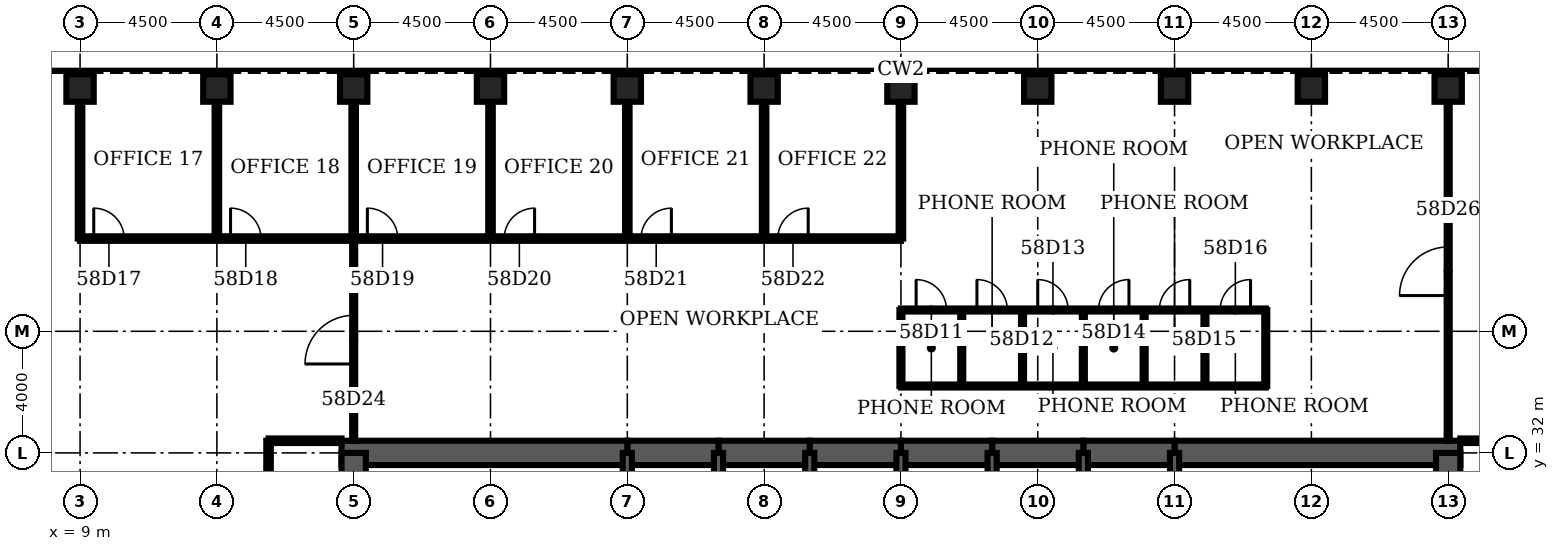
"""IFC4 building model, lengths in metres.
Left out: names, types, materials, properties, quantities, classifications, styles, units other than length and angle.
Written with IfcOpenShell. Run it as: python <this file> out.ifc"""

import sys

from ifc_helpers import new_model, si_unit, direction, frame, frame_2d, origin, origin_2d, place, context, subcontext, project, spatial, rectangle, hollow_rectangle, extrude, element, fill, save


model = new_model("IFC4")
c1 = context("Model", 3, precision=1e-05, world=origin(), true_north=direction((0.0, 1.0)))
c2 = subcontext(c1, "Body", "Model", "MODEL_VIEW")
j1 = project(units=[si_unit("LENGTHUNIT", "METRE"), si_unit("PLANEANGLEUNIT", "RADIAN")], contexts=[c1])
p1 = place(None, origin())
s1 = spatial("IfcSite", under=j1, at=p1, CompositionType="ELEMENT")
p2 = place(p1, origin())
s2 = spatial("IfcBuilding", under=s1, at=p2, CompositionType="ELEMENT")
p3 = place(p2, frame((0.0, 0.0, 257.2)))
s3 = spatial("IfcBuildingStorey", under=s2, at=p3, CompositionType="ELEMENT", Elevation=257.2)
for number, where, z_axis, x_axis in (
    (1, (54.0, 44.0, 0.0), (0.0, 0.0, 1.0), (0.0, 1.0, 0.0)),
    (2, (49.5, 44.0, 0.0), (0.0, 0.0, 1.0), (0.0, 1.0, 0.0)),
    (3, (45.0, 44.0, 0.0), (0.0, 0.0, 1.0), (0.0, 1.0, 0.0)),
    (4, (40.5, 44.0, 0.0), (0.0, 0.0, 1.0), (0.0, 1.0, 0.0)),
    (5, (36.0, 44.0, 0.0), (0.0, 0.0, 1.0), (0.0, 1.0, 0.0)),
    (6, (31.5, 44.0, 0.0), (0.0, 0.0, 1.0), (0.0, 1.0, 0.0)),
    (7, (27.0, 44.0, 0.0), (0.0, 0.0, 1.0), (0.0, 1.0, 0.0)),
    (8, (22.5, 44.0, 0.0), (0.0, 0.0, 1.0), (0.0, 1.0, 0.0)),
    (9, (18.0, 44.0, 0.0), (0.0, 0.0, 1.0), (0.0, 1.0, 0.0)),
    (10, (13.5, 44.0, 0.0), (0.0, 0.0, 1.0), (0.0, 1.0, 0.0)),
    (11, (9.0, 44.0, 0.0), (0.0, 0.0, 1.0), (0.0, 1.0, 0.0)),
):
    element("IfcColumn", number, at=place(p3, frame(where, z_axis=z_axis, x_axis=x_axis)), inside=s3, PredefinedType="COLUMN", context=c2, shape_type="SweptSolid", body=[
        extrude(hollow_rectangle(XDim=0.9, YDim=0.9, WallThickness=0.07, at=origin_2d()), origin(), (0.0, 0.0, 1.0), 4.2),
    ])
p4 = place(p3, frame((54.4, 32.0, 0.0), z_axis=(0.0, 0.0, 1.0), x_axis=(-1.0, 0.0, 0.0)))
e12 = element("IfcWall", 12, at=p4, inside=s3, PredefinedType="SHEAR", context=c2, shape_type="SweptSolid", body=[
    extrude(rectangle(XDim=9.4, YDim=0.8, at=frame_2d((4.7, 0.0))), origin(), (0.0, 0.0, 1.0), 4.2),
])
for number, where, z_axis, x_axis in (
    (13, (45.0, 32.0, 0.0), (0.0, 0.0, 1.0), (-1.0, 0.0, 0.0)),
    (14, (42.0, 32.0, 0.0), (0.0, 0.0, 1.0), (-1.0, 0.0, 0.0)),
    (15, (39.0, 32.0, 0.0), (0.0, 0.0, 1.0), (-1.0, 0.0, 0.0)),
    (16, (36.0, 32.0, 0.0), (0.0, 0.0, 1.0), (-1.0, 0.0, 0.0)),
    (17, (33.0, 32.0, 0.0), (0.0, 0.0, 1.0), (-1.0, 0.0, 0.0)),
    (18, (30.0, 32.0, 0.0), (0.0, 0.0, 1.0), (-1.0, 0.0, 0.0)),
):
    element("IfcWall", number, at=place(p3, frame(where, z_axis=z_axis, x_axis=x_axis)), inside=s3, PredefinedType="SHEAR", context=c2, shape_type="SweptSolid", body=[
        extrude(rectangle(XDim=3.0, YDim=0.8, at=frame_2d((1.5, 0.0))), origin(), (0.0, 0.0, 1.0), 4.2),
    ])
p5 = place(p3, frame((27.0, 32.0, 0.0), z_axis=(0.0, 0.0, 1.0), x_axis=(-1.0, 0.0, 0.0)))
e19 = element("IfcWall", 19, at=p5, inside=s3, PredefinedType="SHEAR", context=c2, shape_type="SweptSolid", body=[
    extrude(rectangle(XDim=9.4, YDim=0.8, at=frame_2d((4.7, 0.0))), origin(), (0.0, 0.0, 1.0), 4.2),
])
for number, where, z_axis, x_axis in (
    (20, (18.0, 32.0, 0.0), (0.0, 0.0, 1.0), (0.0, -1.0, 0.0)),
    (21, (54.0, 28.8, 0.0), (0.0, 0.0, 1.0), (0.0, 1.0, 0.0)),
):
    element("IfcWall", number, at=place(p3, frame(where, z_axis=z_axis, x_axis=x_axis)), inside=s3, PredefinedType="SHEAR", context=c2, shape_type="SweptSolid", body=[
        extrude(rectangle(XDim=3.2, YDim=0.8, at=frame_2d((1.6, 0.0))), origin(), (0.0, 0.0, 1.0), 4.2),
    ])
for number, where, z_axis, x_axis in (
    (22, (27.0, 28.8, 0.0), (0.0, 0.0, 1.0), (0.0, 1.0, 0.0)),
    (23, (30.0, 28.8, 0.0), (0.0, 0.0, 1.0), (0.0, 1.0, 0.0)),
    (24, (33.0, 28.8, 0.0), (0.0, 0.0, 1.0), (0.0, 1.0, 0.0)),
    (25, (36.0, 28.8, 0.0), (0.0, 0.0, 1.0), (0.0, 1.0, 0.0)),
    (26, (39.0, 28.8, 0.0), (0.0, 0.0, 1.0), (0.0, 1.0, 0.0)),
    (27, (42.0, 28.8, 0.0), (0.0, 0.0, 1.0), (0.0, 1.0, 0.0)),
    (28, (45.0, 28.8, 0.0), (0.0, 0.0, 1.0), (0.0, 1.0, 0.0)),
):
    element("IfcWall", number, at=place(p3, frame(where, z_axis=z_axis, x_axis=x_axis)), inside=s3, PredefinedType="SOLIDWALL", context=c2, shape_type="SweptSolid", body=[
        extrude(rectangle(XDim=3.2, YDim=0.3, at=frame_2d((1.6, 0.0))), origin(), (0.0, 0.0, 1.0), 4.2),
    ])
for number, where, z_axis, x_axis in (
    (29, (15.2, 32.4, 0.0), (0.0, 0.0, 1.0), (1.0, 0.0, 0.0)),
    (30, (54.4, 32.4, 0.0), (0.0, 0.0, 1.0), (1.0, 0.0, 0.0)),
):
    element("IfcWall", number, at=place(p3, frame(where, z_axis=z_axis, x_axis=x_axis)), inside=s3, PredefinedType="PARTITIONING", context=c2, shape_type="SweptSolid", body=[
        extrude(rectangle(XDim=2.4, YDim=0.15, at=frame_2d((1.2, 0.0))), origin(), (0.0, 0.0, 1.0), 3.0),
    ])
p6 = place(p3, frame((36.0, 34.2, 0.0), z_axis=(0.0, 0.0, 1.0), x_axis=(1.0, 0.0, 0.0)))
e31 = element("IfcWall", 31, at=p6, inside=s3, PredefinedType="PARTITIONING", context=c2, shape_type="SweptSolid", body=[
    extrude(rectangle(XDim=12.0, YDim=0.1, at=frame_2d((6.0, 0.0))), origin(), (0.0, 0.0, 1.0), 3.0),
])
p7 = place(p3, frame((36.0, 36.7, 0.0), z_axis=(0.0, 0.0, 1.0), x_axis=(1.0, 0.0, 0.0)))
e32 = element("IfcWall", 32, at=p7, inside=s3, PredefinedType="PARTITIONING", context=c2, shape_type="SweptSolid", body=[
    extrude(rectangle(XDim=12.0, YDim=0.1, at=frame_2d((6.0, 0.0))), origin(), (0.0, 0.0, 1.0), 3.0),
])
p8 = place(p7, frame((0.5, 0.0, 0.0)))
e33 = element("IfcOpeningElement", 33, at=p8, cuts=e32, PredefinedType="OPENING", context=c2, shape_type="SweptSolid", body=[
    extrude(rectangle(XDim=1.0, YDim=2.1, at=frame_2d((0.5, 1.05))), frame((0.0, 0.06, 0.0), z_axis=(0.0, -1.0, 0.0), x_axis=(1.0, 0.0, 0.0)), (0.0, 0.0, 1.0), 0.12),
])
p9 = place(p7, frame((2.5, 0.0, 0.0)))
e34 = element("IfcOpeningElement", 34, at=p9, cuts=e32, PredefinedType="OPENING", context=c2, shape_type="SweptSolid", body=[
    extrude(rectangle(XDim=1.0, YDim=2.1, at=frame_2d((0.5, 1.05))), frame((0.0, 0.06, 0.0), z_axis=(0.0, -1.0, 0.0), x_axis=(1.0, 0.0, 0.0)), (0.0, 0.0, 1.0), 0.12),
])
p10 = place(p7, frame((4.5, 0.0, 0.0)))
e35 = element("IfcOpeningElement", 35, at=p10, cuts=e32, PredefinedType="OPENING", context=c2, shape_type="SweptSolid", body=[
    extrude(rectangle(XDim=1.0, YDim=2.1, at=frame_2d((0.5, 1.05))), frame((0.0, 0.06, 0.0), z_axis=(0.0, -1.0, 0.0), x_axis=(1.0, 0.0, 0.0)), (0.0, 0.0, 1.0), 0.12),
])
p11 = place(p7, frame((6.5, 0.0, 0.0)))
e36 = element("IfcOpeningElement", 36, at=p11, cuts=e32, PredefinedType="OPENING", context=c2, shape_type="SweptSolid", body=[
    extrude(rectangle(XDim=1.0, YDim=2.1, at=frame_2d((0.5, 1.05))), frame((0.0, 0.06, 0.0), z_axis=(0.0, -1.0, 0.0), x_axis=(1.0, 0.0, 0.0)), (0.0, 0.0, 1.0), 0.12),
])
p12 = place(p7, frame((8.5, 0.0, 0.0)))
e37 = element("IfcOpeningElement", 37, at=p12, cuts=e32, PredefinedType="OPENING", context=c2, shape_type="SweptSolid", body=[
    extrude(rectangle(XDim=1.0, YDim=2.1, at=frame_2d((0.5, 1.05))), frame((0.0, 0.06, 0.0), z_axis=(0.0, -1.0, 0.0), x_axis=(1.0, 0.0, 0.0)), (0.0, 0.0, 1.0), 0.12),
])
p13 = place(p7, frame((10.5, 0.0, 0.0)))
e38 = element("IfcOpeningElement", 38, at=p13, cuts=e32, PredefinedType="OPENING", context=c2, shape_type="SweptSolid", body=[
    extrude(rectangle(XDim=1.0, YDim=2.1, at=frame_2d((0.5, 1.05))), frame((0.0, 0.06, 0.0), z_axis=(0.0, -1.0, 0.0), x_axis=(1.0, 0.0, 0.0)), (0.0, 0.0, 1.0), 0.12),
])
p14 = place(p3, frame((9.0, 39.05, 0.0), z_axis=(0.0, 0.0, 1.0), x_axis=(1.0, 0.0, 0.0)))
e39 = element("IfcWall", 39, at=p14, inside=s3, PredefinedType="PARTITIONING", context=c2, shape_type="SweptSolid", body=[
    extrude(rectangle(XDim=27.0, YDim=0.15, at=frame_2d((13.5, 0.0))), origin(), (0.0, 0.0, 1.0), 3.0),
])
p15 = place(p14, frame((0.45, 0.0, 0.0)))
e40 = element("IfcOpeningElement", 40, at=p15, cuts=e39, PredefinedType="OPENING", context=c2, shape_type="SweptSolid", body=[
    extrude(rectangle(XDim=1.0, YDim=2.1, at=frame_2d((0.5, 1.05))), frame((0.0, 0.085, 0.0), z_axis=(0.0, -1.0, 0.0), x_axis=(1.0, 0.0, 0.0)), (0.0, 0.0, 1.0), 0.17),
])
p16 = place(p14, frame((4.95, 0.0, 0.0)))
e41 = element("IfcOpeningElement", 41, at=p16, cuts=e39, PredefinedType="OPENING", context=c2, shape_type="SweptSolid", body=[
    extrude(rectangle(XDim=1.0, YDim=2.1, at=frame_2d((0.5, 1.05))), frame((0.0, 0.085, 0.0), z_axis=(0.0, -1.0, 0.0), x_axis=(1.0, 0.0, 0.0)), (0.0, 0.0, 1.0), 0.17),
])
p17 = place(p14, frame((9.45, 0.0, 0.0)))
e42 = element("IfcOpeningElement", 42, at=p17, cuts=e39, PredefinedType="OPENING", context=c2, shape_type="SweptSolid", body=[
    extrude(rectangle(XDim=1.0, YDim=2.1, at=frame_2d((0.5, 1.05))), frame((0.0, 0.085, 0.0), z_axis=(0.0, -1.0, 0.0), x_axis=(1.0, 0.0, 0.0)), (0.0, 0.0, 1.0), 0.17),
])
p18 = place(p14, frame((13.95, 0.0, 0.0)))
e43 = element("IfcOpeningElement", 43, at=p18, cuts=e39, PredefinedType="OPENING", context=c2, shape_type="SweptSolid", body=[
    extrude(rectangle(XDim=1.0, YDim=2.1, at=frame_2d((0.5, 1.05))), frame((0.0, 0.085, 0.0), z_axis=(0.0, -1.0, 0.0), x_axis=(1.0, 0.0, 0.0)), (0.0, 0.0, 1.0), 0.17),
])
p19 = place(p14, frame((18.45, 0.0, 0.0)))
e44 = element("IfcOpeningElement", 44, at=p19, cuts=e39, PredefinedType="OPENING", context=c2, shape_type="SweptSolid", body=[
    extrude(rectangle(XDim=1.0, YDim=2.1, at=frame_2d((0.5, 1.05))), frame((0.0, 0.085, 0.0), z_axis=(0.0, -1.0, 0.0), x_axis=(1.0, 0.0, 0.0)), (0.0, 0.0, 1.0), 0.17),
])
p20 = place(p14, frame((22.95, 0.0, 0.0)))
e45 = element("IfcOpeningElement", 45, at=p20, cuts=e39, PredefinedType="OPENING", context=c2, shape_type="SweptSolid", body=[
    extrude(rectangle(XDim=1.0, YDim=2.1, at=frame_2d((0.5, 1.05))), frame((0.0, 0.085, 0.0), z_axis=(0.0, -1.0, 0.0), x_axis=(1.0, 0.0, 0.0)), (0.0, 0.0, 1.0), 0.17),
])
for number, where, z_axis, x_axis in (
    (46, (9.0, 39.05, 0.0), (0.0, 0.0, 1.0), (0.0, 1.0, 0.0)),
    (47, (13.5, 39.05, 0.0), (0.0, 0.0, 1.0), (0.0, 1.0, 0.0)),
):
    element("IfcWall", number, at=place(p3, frame(where, z_axis=z_axis, x_axis=x_axis)), inside=s3, PredefinedType="PARTITIONING", context=c2, shape_type="SweptSolid", body=[
        extrude(rectangle(XDim=4.5, YDim=0.15, at=frame_2d((2.25, 0.0))), origin(), (0.0, 0.0, 1.0), 3.0),
    ])
p21 = place(p3, frame((15.2, 13.8, 0.0), z_axis=(0.0, 0.0, 1.0), x_axis=(0.0, 1.0, 0.0)))
e48 = element("IfcWall", 48, at=p21, inside=s3, PredefinedType="PARTITIONING", context=c2, shape_type="SweptSolid", body=[
    extrude(rectangle(XDim=18.6, YDim=0.15, at=frame_2d((9.3, 0.0))), origin(), (0.0, 0.0, 1.0), 3.0),
])
p22 = place(p21, frame((8.7, 0.0, 0.0)))
e49 = element("IfcOpeningElement", 49, at=p22, cuts=e48, PredefinedType="OPENING", context=c2, shape_type="SweptSolid", body=[
    extrude(rectangle(XDim=1.2, YDim=2.1, at=frame_2d((0.6, 1.05))), frame((0.0, 0.085, 0.0), z_axis=(0.0, -1.0, 0.0), x_axis=(1.0, 0.0, 0.0)), (0.0, 0.0, 1.0), 0.17),
])
p23 = place(p3, frame((18.0, 32.4, 0.0), z_axis=(0.0, 0.0, 1.0), x_axis=(0.0, 1.0, 0.0)))
e50 = element("IfcWall", 50, at=p23, inside=s3, PredefinedType="PARTITIONING", context=c2, shape_type="SweptSolid", body=[
    extrude(rectangle(XDim=6.65, YDim=0.1, at=frame_2d((3.325, 0.0))), origin(), (0.0, 0.0, 1.0), 3.0),
])
p24 = place(p23, frame((2.525, 0.0, 0.0)))
e51 = element("IfcOpeningElement", 51, at=p24, cuts=e50, PredefinedType="OPENING", context=c2, shape_type="SweptSolid", body=[
    extrude(rectangle(XDim=1.6, YDim=2.1, at=frame_2d((0.8, 1.05))), frame((0.0, 0.06, 0.0), z_axis=(0.0, -1.0, 0.0), x_axis=(1.0, 0.0, 0.0)), (0.0, 0.0, 1.0), 0.12),
])
for number, where, z_axis, x_axis in (
    (52, (18.0, 39.05, 0.0), (0.0, 0.0, 1.0), (0.0, 1.0, 0.0)),
    (53, (22.5, 39.05, 0.0), (0.0, 0.0, 1.0), (0.0, 1.0, 0.0)),
    (54, (27.0, 39.05, 0.0), (0.0, 0.0, 1.0), (0.0, 1.0, 0.0)),
    (55, (31.5, 39.05, 0.0), (0.0, 0.0, 1.0), (0.0, 1.0, 0.0)),
):
    element("IfcWall", number, at=place(p3, frame(where, z_axis=z_axis, x_axis=x_axis)), inside=s3, PredefinedType="PARTITIONING", context=c2, shape_type="SweptSolid", body=[
        extrude(rectangle(XDim=4.5, YDim=0.15, at=frame_2d((2.25, 0.0))), origin(), (0.0, 0.0, 1.0), 3.0),
    ])
p25 = place(p3, frame((36.0, 34.2, 0.0), z_axis=(0.0, 0.0, 1.0), x_axis=(0.0, 1.0, 0.0)))
e56 = element("IfcWall", 56, at=p25, inside=s3, PredefinedType="PARTITIONING", context=c2, shape_type="SweptSolid", body=[
    extrude(rectangle(XDim=2.5, YDim=0.1, at=frame_2d((1.25, 0.0))), origin(), (0.0, 0.0, 1.0), 3.0),
])
p26 = place(p3, frame((36.0, 39.05, 0.0), z_axis=(0.0, 0.0, 1.0), x_axis=(0.0, 1.0, 0.0)))
e57 = element("IfcWall", 57, at=p26, inside=s3, PredefinedType="PARTITIONING", context=c2, shape_type="SweptSolid", body=[
    extrude(rectangle(XDim=4.5, YDim=0.15, at=frame_2d((2.25, 0.0))), origin(), (0.0, 0.0, 1.0), 3.0),
])
for number, where, z_axis, x_axis in (
    (58, (38.0, 34.2, 0.0), (0.0, 0.0, 1.0), (0.0, 1.0, 0.0)),
    (59, (40.0, 34.2, 0.0), (0.0, 0.0, 1.0), (0.0, 1.0, 0.0)),
    (60, (42.0, 34.2, 0.0), (0.0, 0.0, 1.0), (0.0, 1.0, 0.0)),
    (61, (44.0, 34.2, 0.0), (0.0, 0.0, 1.0), (0.0, 1.0, 0.0)),
    (62, (46.0, 34.2, 0.0), (0.0, 0.0, 1.0), (0.0, 1.0, 0.0)),
    (63, (48.0, 34.2, 0.0), (0.0, 0.0, 1.0), (0.0, 1.0, 0.0)),
):
    element("IfcWall", number, at=place(p3, frame(where, z_axis=z_axis, x_axis=x_axis)), inside=s3, PredefinedType="PARTITIONING", context=c2, shape_type="SweptSolid", body=[
        extrude(rectangle(XDim=2.5, YDim=0.1, at=frame_2d((1.25, 0.0))), origin(), (0.0, 0.0, 1.0), 3.0),
    ])
p27 = place(p3, frame((54.0, 32.4, 0.0), z_axis=(0.0, 0.0, 1.0), x_axis=(0.0, 1.0, 0.0)))
e64 = element("IfcWall", 64, at=p27, inside=s3, PredefinedType="PARTITIONING", context=c2, shape_type="SweptSolid", body=[
    extrude(rectangle(XDim=11.15, YDim=0.1, at=frame_2d((5.575, 0.0))), origin(), (0.0, 0.0, 1.0), 3.0),
])
p28 = place(p27, frame((4.775, 0.0, 0.0)))
e65 = element("IfcOpeningElement", 65, at=p28, cuts=e64, PredefinedType="OPENING", context=c2, shape_type="SweptSolid", body=[
    extrude(rectangle(XDim=1.6, YDim=2.1, at=frame_2d((0.8, 1.05))), frame((0.0, 0.06, 0.0), z_axis=(0.0, -1.0, 0.0), x_axis=(1.0, 0.0, 0.0)), (0.0, 0.0, 1.0), 0.12),
])
p29 = place(p8, origin())
e66 = element("IfcDoor", 66, at=p29, inside=s3, OperationType="SINGLE_SWING_LEFT", PredefinedType="DOOR", context=c2, shape_type="SweptSolid", body=[
    extrude(rectangle(XDim=1.0, YDim=2.1, at=frame_2d((0.5, 1.05))), frame((0.0, 0.025, 0.0), z_axis=(0.0, -1.0, 0.0), x_axis=(1.0, 0.0, 0.0)), (0.0, 0.0, 1.0), 0.05),
])
fill(e33, e66)
p30 = place(p9, origin())
e67 = element("IfcDoor", 67, at=p30, inside=s3, OperationType="SINGLE_SWING_LEFT", PredefinedType="DOOR", context=c2, shape_type="SweptSolid", body=[
    extrude(rectangle(XDim=1.0, YDim=2.1, at=frame_2d((0.5, 1.05))), frame((0.0, 0.025, 0.0), z_axis=(0.0, -1.0, 0.0), x_axis=(1.0, 0.0, 0.0)), (0.0, 0.0, 1.0), 0.05),
])
fill(e34, e67)
p31 = place(p10, origin())
e68 = element("IfcDoor", 68, at=p31, inside=s3, OperationType="SINGLE_SWING_LEFT", PredefinedType="DOOR", context=c2, shape_type="SweptSolid", body=[
    extrude(rectangle(XDim=1.0, YDim=2.1, at=frame_2d((0.5, 1.05))), frame((0.0, 0.025, 0.0), z_axis=(0.0, -1.0, 0.0), x_axis=(1.0, 0.0, 0.0)), (0.0, 0.0, 1.0), 0.05),
])
fill(e35, e68)
p32 = place(p11, origin())
e69 = element("IfcDoor", 69, at=p32, inside=s3, OperationType="SINGLE_SWING_RIGHT", PredefinedType="DOOR", context=c2, shape_type="SweptSolid", body=[
    extrude(rectangle(XDim=1.0, YDim=2.1, at=frame_2d((0.5, 1.05))), frame((0.0, 0.025, 0.0), z_axis=(0.0, -1.0, 0.0), x_axis=(1.0, 0.0, 0.0)), (0.0, 0.0, 1.0), 0.05),
])
fill(e36, e69)
p33 = place(p12, origin())
e70 = element("IfcDoor", 70, at=p33, inside=s3, OperationType="SINGLE_SWING_RIGHT", PredefinedType="DOOR", context=c2, shape_type="SweptSolid", body=[
    extrude(rectangle(XDim=1.0, YDim=2.1, at=frame_2d((0.5, 1.05))), frame((0.0, 0.025, 0.0), z_axis=(0.0, -1.0, 0.0), x_axis=(1.0, 0.0, 0.0)), (0.0, 0.0, 1.0), 0.05),
])
fill(e37, e70)
p34 = place(p13, origin())
e71 = element("IfcDoor", 71, at=p34, inside=s3, OperationType="SINGLE_SWING_RIGHT", PredefinedType="DOOR", context=c2, shape_type="SweptSolid", body=[
    extrude(rectangle(XDim=1.0, YDim=2.1, at=frame_2d((0.5, 1.05))), frame((0.0, 0.025, 0.0), z_axis=(0.0, -1.0, 0.0), x_axis=(1.0, 0.0, 0.0)), (0.0, 0.0, 1.0), 0.05),
])
fill(e38, e71)
p35 = place(p15, origin())
e72 = element("IfcDoor", 72, at=p35, inside=s3, OperationType="SINGLE_SWING_LEFT", PredefinedType="DOOR", context=c2, shape_type="SweptSolid", body=[
    extrude(rectangle(XDim=1.0, YDim=2.1, at=frame_2d((0.5, 1.05))), frame((0.0, 0.025, 0.0), z_axis=(0.0, -1.0, 0.0), x_axis=(1.0, 0.0, 0.0)), (0.0, 0.0, 1.0), 0.05),
])
fill(e40, e72)
p36 = place(p16, origin())
e73 = element("IfcDoor", 73, at=p36, inside=s3, OperationType="SINGLE_SWING_LEFT", PredefinedType="DOOR", context=c2, shape_type="SweptSolid", body=[
    extrude(rectangle(XDim=1.0, YDim=2.1, at=frame_2d((0.5, 1.05))), frame((0.0, 0.025, 0.0), z_axis=(0.0, -1.0, 0.0), x_axis=(1.0, 0.0, 0.0)), (0.0, 0.0, 1.0), 0.05),
])
fill(e41, e73)
p37 = place(p17, origin())
e74 = element("IfcDoor", 74, at=p37, inside=s3, OperationType="SINGLE_SWING_LEFT", PredefinedType="DOOR", context=c2, shape_type="SweptSolid", body=[
    extrude(rectangle(XDim=1.0, YDim=2.1, at=frame_2d((0.5, 1.05))), frame((0.0, 0.025, 0.0), z_axis=(0.0, -1.0, 0.0), x_axis=(1.0, 0.0, 0.0)), (0.0, 0.0, 1.0), 0.05),
])
fill(e42, e74)
p38 = place(p18, origin())
e75 = element("IfcDoor", 75, at=p38, inside=s3, OperationType="SINGLE_SWING_RIGHT", PredefinedType="DOOR", context=c2, shape_type="SweptSolid", body=[
    extrude(rectangle(XDim=1.0, YDim=2.1, at=frame_2d((0.5, 1.05))), frame((0.0, 0.025, 0.0), z_axis=(0.0, -1.0, 0.0), x_axis=(1.0, 0.0, 0.0)), (0.0, 0.0, 1.0), 0.05),
])
fill(e43, e75)
p39 = place(p19, origin())
e76 = element("IfcDoor", 76, at=p39, inside=s3, OperationType="SINGLE_SWING_RIGHT", PredefinedType="DOOR", context=c2, shape_type="SweptSolid", body=[
    extrude(rectangle(XDim=1.0, YDim=2.1, at=frame_2d((0.5, 1.05))), frame((0.0, 0.025, 0.0), z_axis=(0.0, -1.0, 0.0), x_axis=(1.0, 0.0, 0.0)), (0.0, 0.0, 1.0), 0.05),
])
fill(e44, e76)
p40 = place(p20, origin())
e77 = element("IfcDoor", 77, at=p40, inside=s3, OperationType="SINGLE_SWING_RIGHT", PredefinedType="DOOR", context=c2, shape_type="SweptSolid", body=[
    extrude(rectangle(XDim=1.0, YDim=2.1, at=frame_2d((0.5, 1.05))), frame((0.0, 0.025, 0.0), z_axis=(0.0, -1.0, 0.0), x_axis=(1.0, 0.0, 0.0)), (0.0, 0.0, 1.0), 0.05),
])
fill(e45, e77)
p41 = place(p24, origin())
e78 = element("IfcDoor", 78, at=p41, inside=s3, OperationType="SINGLE_SWING_LEFT", PredefinedType="DOOR", context=c2, shape_type="SweptSolid", body=[
    extrude(rectangle(XDim=1.6, YDim=2.1, at=frame_2d((0.8, 1.05))), frame((0.0, 0.025, 0.0), z_axis=(0.0, -1.0, 0.0), x_axis=(1.0, 0.0, 0.0)), (0.0, 0.0, 1.0), 0.05),
])
fill(e51, e78)
p42 = place(p28, origin())
e79 = element("IfcDoor", 79, at=p42, inside=s3, OperationType="SINGLE_SWING_LEFT", PredefinedType="DOOR", context=c2, shape_type="SweptSolid", body=[
    extrude(rectangle(XDim=1.6, YDim=2.1, at=frame_2d((0.8, 1.05))), frame((0.0, 0.025, 0.0), z_axis=(0.0, -1.0, 0.0), x_axis=(1.0, 0.0, 0.0)), (0.0, 0.0, 1.0), 0.05),
])
fill(e65, e79)
save(model, sys.argv[1])
